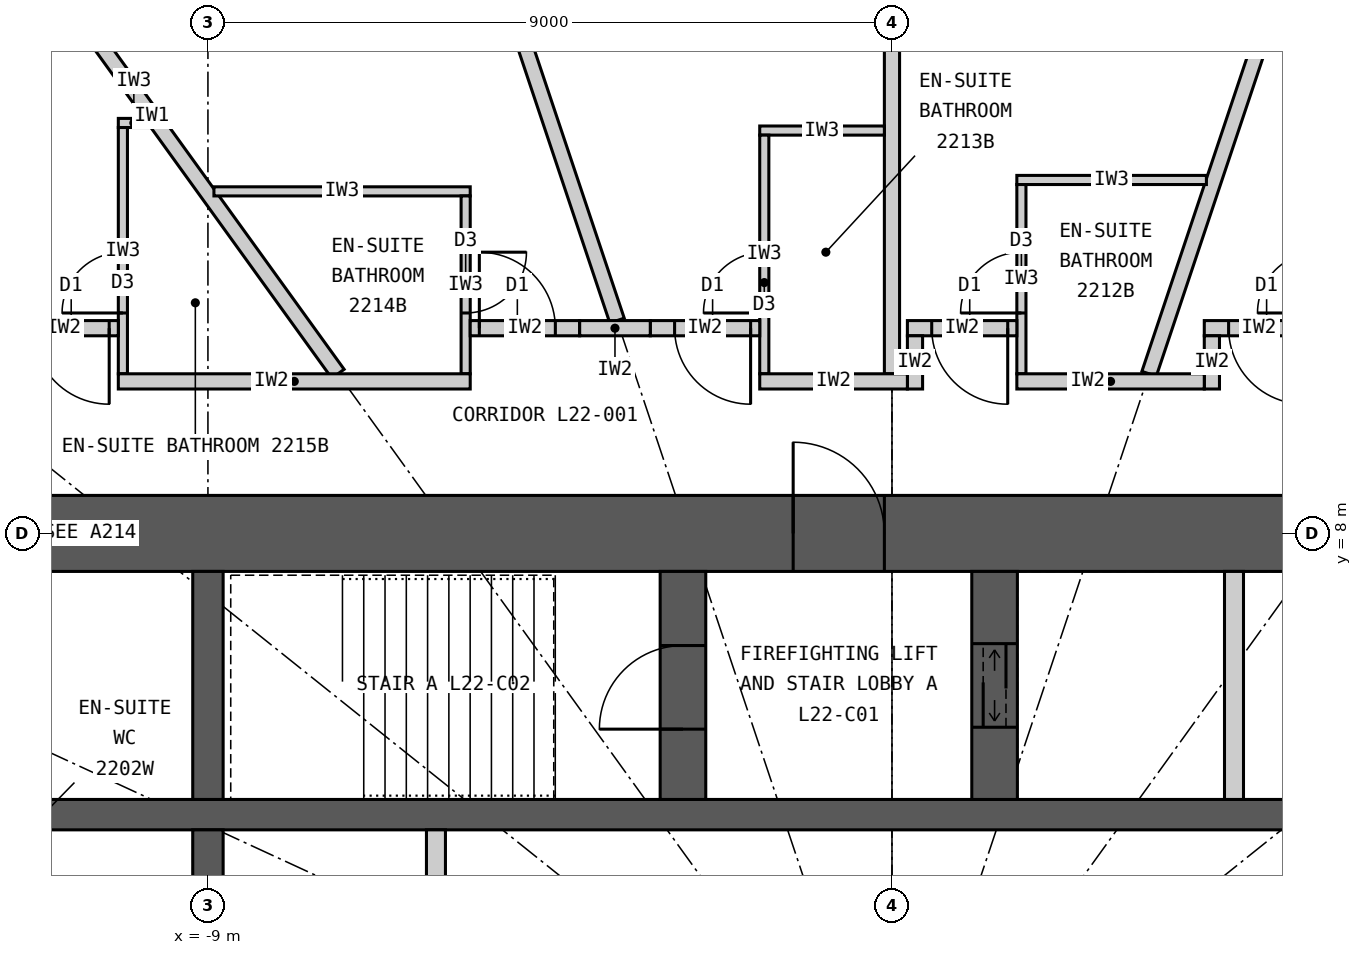
"""IFC4 building model, lengths in metres.
Left out: names, types, materials, properties, quantities, classifications, styles, units other than length and angle.
Written with IfcOpenShell. Run it as: python <this file> out.ifc"""

import sys

from ifc_helpers import new_model, si_unit, direction, frame, frame_2d, origin, place, context, subcontext, project, spatial, rectangle, extrude, element, fill, save


model = new_model("IFC4")
c1 = context("Model", 3, precision=1e-05, world=origin(), true_north=direction((0.0, 1.0)))
c2 = subcontext(c1, "Body", "Model", "MODEL_VIEW")
j1 = project(units=[si_unit("LENGTHUNIT", "METRE"), si_unit("PLANEANGLEUNIT", "RADIAN")], contexts=[c1])
p1 = place(None, origin())
s1 = spatial("IfcSite", under=j1, at=p1, CompositionType="ELEMENT")
p2 = place(p1, origin())
s2 = spatial("IfcBuilding", under=s1, at=p2, CompositionType="ELEMENT")
p3 = place(p2, frame((0.0, 0.0, 87.0)))
s3 = spatial("IfcBuildingStorey", under=s2, at=p3, CompositionType="ELEMENT", Elevation=87.0)
p4 = place(p3, frame((-12.5, 8.0, 0.0), z_axis=(0.0, 0.0, 1.0), x_axis=(1.0, 0.0, 0.0)))
e1 = element("IfcWall", 1, at=p4, inside=s3, PredefinedType="SHEAR", context=c2, shape_type="SweptSolid", body=[
    extrude(rectangle(XDim=25.0, YDim=1.0, at=frame_2d((12.5, 0.0))), origin(), (0.0, 0.0, 1.0), 3.3),
])
p5 = place(p4, frame((11.2, 0.0, 0.0)))
e2 = element("IfcOpeningElement", 2, at=p5, cuts=e1, PredefinedType="OPENING", context=c2, shape_type="SweptSolid", body=[
    extrude(rectangle(XDim=1.2, YDim=2.2, at=frame_2d((0.6, 1.1))), frame((0.0, 0.51, 0.0), z_axis=(0.0, -1.0, 0.0), x_axis=(1.0, 0.0, 0.0)), (0.0, 0.0, 1.0), 1.02),
])
p6 = place(p4, frame((18.8, 0.0, 0.0)))
e3 = element("IfcOpeningElement", 3, at=p6, cuts=e1, PredefinedType="OPENING", context=c2, shape_type="SweptSolid", body=[
    extrude(rectangle(XDim=0.9, YDim=2.2, at=frame_2d((0.45, 1.1))), frame((0.0, 0.51, 0.0), z_axis=(0.0, -1.0, 0.0), x_axis=(1.0, 0.0, 0.0)), (0.0, 0.0, 1.0), 1.02),
])
p7 = place(p3, frame((-11.5, 4.3, 0.0), z_axis=(0.0, 0.0, 1.0), x_axis=(1.0, 0.0, 0.0)))
e4 = element("IfcWall", 4, at=p7, inside=s3, PredefinedType="SHEAR", context=c2, shape_type="SweptSolid", body=[
    extrude(rectangle(XDim=23.0, YDim=0.4, at=frame_2d((11.5, 0.0))), origin(), (0.0, 0.0, 1.0), 3.3),
])
p8 = place(p3, frame((-9.0, 4.5, 0.0), z_axis=(0.0, 0.0, 1.0), x_axis=(0.0, 1.0, 0.0)))
e5 = element("IfcWall", 5, at=p8, inside=s3, PredefinedType="SHEAR", context=c2, shape_type="SweptSolid", body=[
    extrude(rectangle(XDim=3.0, YDim=0.4, at=frame_2d((1.5, 0.0))), origin(), (0.0, 0.0, 1.0), 3.3),
])
p9 = place(p3, frame((-9.0, 1.75, 0.0), z_axis=(0.0, 0.0, 1.0), x_axis=(0.0, 1.0, 0.0)))
e6 = element("IfcWall", 6, at=p9, inside=s3, PredefinedType="SHEAR", context=c2, shape_type="SweptSolid", body=[
    extrude(rectangle(XDim=2.35, YDim=0.4, at=frame_2d((1.175, 0.0))), origin(), (0.0, 0.0, 1.0), 3.3),
])
p10 = place(p3, frame((-2.75, 4.5, 0.0), z_axis=(0.0, 0.0, 1.0), x_axis=(0.0, 1.0, 0.0)))
e7 = element("IfcWall", 7, at=p10, inside=s3, PredefinedType="SHEAR", context=c2, shape_type="SweptSolid", body=[
    extrude(rectangle(XDim=3.0, YDim=0.6, at=frame_2d((1.5, 0.0))), origin(), (0.0, 0.0, 1.0), 3.3),
])
p11 = place(p10, frame((0.925, 0.0, 0.0)))
e8 = element("IfcOpeningElement", 8, at=p11, cuts=e7, PredefinedType="OPENING", context=c2, shape_type="SweptSolid", body=[
    extrude(rectangle(XDim=1.1, YDim=2.2, at=frame_2d((0.55, 1.1))), frame((0.0, 0.31, 0.0), z_axis=(0.0, -1.0, 0.0), x_axis=(1.0, 0.0, 0.0)), (0.0, 0.0, 1.0), 0.62),
])
p12 = place(p3, frame((1.35, 4.5, 0.0), z_axis=(0.0, 0.0, 1.0), x_axis=(0.0, 1.0, 0.0)))
e9 = element("IfcWall", 9, at=p12, inside=s3, PredefinedType="SHEAR", context=c2, shape_type="SweptSolid", body=[
    extrude(rectangle(XDim=3.0, YDim=0.6, at=frame_2d((1.5, 0.0))), origin(), (0.0, 0.0, 1.0), 3.3),
])
p13 = place(p12, frame((0.95, 0.0, 0.0)))
e10 = element("IfcOpeningElement", 10, at=p13, cuts=e9, PredefinedType="OPENING", context=c2, shape_type="SweptSolid", body=[
    extrude(rectangle(XDim=1.1, YDim=2.2, at=frame_2d((0.55, 1.1))), frame((0.0, 0.31, 0.0), z_axis=(0.0, -1.0, 0.0), x_axis=(1.0, 0.0, 0.0)), (0.0, 0.0, 1.0), 0.62),
])
p14 = place(p3, frame((4.5, 4.5, 0.0), z_axis=(0.0, 0.0, 1.0), x_axis=(0.0, 1.0, 0.0)))
e11 = element("IfcWall", 11, at=p14, inside=s3, PredefinedType="PARTITIONING", context=c2, shape_type="SweptSolid", body=[
    extrude(rectangle(XDim=3.0, YDim=0.25, at=frame_2d((1.5, 0.0))), origin(), (0.0, 0.0, 1.0), 3.3),
])
p15 = place(p3, frame((-6.0, 1.75, 0.0), z_axis=(0.0, 0.0, 1.0), x_axis=(0.0, 1.0, 0.0)))
e12 = element("IfcWall", 12, at=p15, inside=s3, PredefinedType="PARTITIONING", context=c2, shape_type="SweptSolid", body=[
    extrude(rectangle(XDim=2.35, YDim=0.25, at=frame_2d((1.175, 0.0))), origin(), (0.0, 0.0, 1.0), 3.3),
])
p16 = place(p3, frame((3.383, 10.1, 0.0), z_axis=(0.0, 0.0, 1.0), x_axis=(0.31759592231, 0.948226149256, 0.0)))
e13 = element("IfcWall", 13, at=p16, inside=s3, PredefinedType="PARTITIONING", context=c2, shape_type="SweptSolid", body=[
    extrude(rectangle(XDim=9.098, YDim=0.2, at=frame_2d((4.549, 0.0))), origin(), (0.0, 0.0, 1.0), 2.27),
])
p17 = place(p3, frame((0.0, 10.1, 0.0), z_axis=(0.0, 0.0, 1.0), x_axis=(0.0, 1.0, 0.0)))
e14 = element("IfcWall", 14, at=p17, inside=s3, PredefinedType="PARTITIONING", context=c2, shape_type="SweptSolid", body=[
    extrude(rectangle(XDim=9.25, YDim=0.2, at=frame_2d((4.625, 0.0))), origin(), (0.0, 0.0, 1.0), 2.27),
])
p18 = place(p3, frame((-3.617, 10.8, 0.0), z_axis=(0.0, 0.0, 1.0), x_axis=(-0.317576599239, 0.948232621046, 0.0)))
e15 = element("IfcWall", 15, at=p18, inside=s3, PredefinedType="PARTITIONING", context=c2, shape_type="SweptSolid", body=[
    extrude(rectangle(XDim=8.36, YDim=0.2, at=frame_2d((4.18, 0.0))), origin(), (0.0, 0.0, 1.0), 2.27),
])
p19 = place(p3, frame((-7.289, 10.1, 0.0), z_axis=(0.0, 0.0, 1.0), x_axis=(-0.585198353053, 0.810890182197, 0.0)))
e16 = element("IfcWall", 16, at=p19, inside=s3, PredefinedType="PARTITIONING", context=c2, shape_type="SweptSolid", body=[
    extrude(rectangle(XDim=8.36, YDim=0.2, at=frame_2d((4.18, 0.0))), origin(), (0.0, 0.0, 1.0), 2.27),
])
p20 = place(p3, frame((4.137, 12.65, 0.0), z_axis=(0.0, 0.0, 1.0), x_axis=(-1.0, 0.0, 0.0)))
e17 = element("IfcWall", 17, at=p20, inside=s3, PredefinedType="PARTITIONING", context=c2, shape_type="SweptSolid", body=[
    extrude(rectangle(XDim=2.494, YDim=0.12, at=frame_2d((1.247, 0.0))), origin(), (0.0, 0.0, 1.0), 3.12),
])
p21 = place(p3, frame((1.703, 10.1, 0.0), z_axis=(0.0, 0.0, 1.0), x_axis=(0.0, 1.0, 0.0)))
e18 = element("IfcWall", 18, at=p21, inside=s3, PredefinedType="PARTITIONING", context=c2, shape_type="SweptSolid", body=[
    extrude(rectangle(XDim=2.49, YDim=0.12, at=frame_2d((1.245, 0.0))), origin(), (0.0, 0.0, 1.0), 3.12),
])
p22 = place(p21, frame((0.8, 0.0, 0.0)))
e19 = element("IfcOpeningElement", 19, at=p22, cuts=e18, PredefinedType="OPENING", context=c2, shape_type="SweptSolid", body=[
    extrude(rectangle(XDim=0.8, YDim=2.1, at=frame_2d((0.4, 1.05))), frame((0.0, 0.07, 0.0), z_axis=(0.0, -1.0, 0.0), x_axis=(1.0, 0.0, 0.0)), (0.0, 0.0, 1.0), 0.14),
])
p23 = place(p3, frame((-0.1, 13.3, 0.0), z_axis=(0.0, 0.0, 1.0), x_axis=(-1.0, 0.0, 0.0)))
e20 = element("IfcWall", 20, at=p23, inside=s3, PredefinedType="PARTITIONING", context=c2, shape_type="SweptSolid", body=[
    extrude(rectangle(XDim=1.64, YDim=0.12, at=frame_2d((0.82, 0.0))), origin(), (0.0, 0.0, 1.0), 3.12),
])
p24 = place(p3, frame((-1.68, 10.1, 0.0), z_axis=(0.0, 0.0, 1.0), x_axis=(0.0, 1.0, 0.0)))
e21 = element("IfcWall", 21, at=p24, inside=s3, PredefinedType="PARTITIONING", context=c2, shape_type="SweptSolid", body=[
    extrude(rectangle(XDim=3.14, YDim=0.12, at=frame_2d((1.57, 0.0))), origin(), (0.0, 0.0, 1.0), 3.12),
])
p25 = place(p24, frame((0.8, 0.0, 0.0)))
e22 = element("IfcOpeningElement", 22, at=p25, cuts=e21, PredefinedType="OPENING", context=c2, shape_type="SweptSolid", body=[
    extrude(rectangle(XDim=0.8, YDim=2.1, at=frame_2d((0.4, 1.05))), frame((0.0, 0.07, 0.0), z_axis=(0.0, -1.0, 0.0), x_axis=(1.0, 0.0, 0.0)), (0.0, 0.0, 1.0), 0.14),
])
p26 = place(p3, frame((-8.921, 12.5, 0.0), z_axis=(0.0, 0.0, 1.0), x_axis=(1.0, 0.0, 0.0)))
e23 = element("IfcWall", 23, at=p26, inside=s3, PredefinedType="PARTITIONING", context=c2, shape_type="SweptSolid", body=[
    extrude(rectangle(XDim=3.372, YDim=0.12, at=frame_2d((1.686, 0.0))), origin(), (0.0, 0.0, 1.0), 3.12),
])
p27 = place(p3, frame((-5.609, 10.1, 0.0), z_axis=(0.0, 0.0, 1.0), x_axis=(0.0, 1.0, 0.0)))
e24 = element("IfcWall", 24, at=p27, inside=s3, PredefinedType="PARTITIONING", context=c2, shape_type="SweptSolid", body=[
    extrude(rectangle(XDim=2.34, YDim=0.12, at=frame_2d((1.17, 0.0))), origin(), (0.0, 0.0, 1.0), 3.12),
])
p28 = place(p27, frame((0.8, 0.0, 0.0)))
e25 = element("IfcOpeningElement", 25, at=p28, cuts=e24, PredefinedType="OPENING", context=c2, shape_type="SweptSolid", body=[
    extrude(rectangle(XDim=0.8, YDim=2.1, at=frame_2d((0.4, 1.05))), frame((0.0, 0.07, 0.0), z_axis=(0.0, -1.0, 0.0), x_axis=(1.0, 0.0, 0.0)), (0.0, 0.0, 1.0), 0.14),
])
p29 = place(p3, frame((-9.771, 13.4, 0.0), z_axis=(0.0, 0.0, 1.0), x_axis=(-1.0, 0.0, 0.0)))
e26 = element("IfcWall", 26, at=p29, inside=s3, PredefinedType="PARTITIONING", context=c2, shape_type="SweptSolid", body=[
    extrude(rectangle(XDim=0.408, YDim=0.12, at=frame_2d((0.204, 0.0))), origin(), (0.0, 0.0, 1.0), 3.12),
])
p30 = place(p3, frame((-10.119, 10.1, 0.0), z_axis=(0.0, 0.0, 1.0), x_axis=(0.0, 1.0, 0.0)))
e27 = element("IfcWall", 27, at=p30, inside=s3, PredefinedType="PARTITIONING", context=c2, shape_type="SweptSolid", body=[
    extrude(rectangle(XDim=3.24, YDim=0.12, at=frame_2d((1.62, 0.0))), origin(), (0.0, 0.0, 1.0), 3.12),
])
p31 = place(p30, frame((0.8, 0.0, 0.0)))
e28 = element("IfcOpeningElement", 28, at=p31, cuts=e27, PredefinedType="OPENING", context=c2, shape_type="SweptSolid", body=[
    extrude(rectangle(XDim=0.8, YDim=2.1, at=frame_2d((0.4, 1.05))), frame((0.0, 0.07, 0.0), z_axis=(0.0, -1.0, 0.0), x_axis=(1.0, 0.0, 0.0)), (0.0, 0.0, 1.0), 0.14),
])
p32 = place(p3, frame((4.109, 10.7, 0.0), z_axis=(0.0, 0.0, 1.0), x_axis=(1.0, 0.0, 0.0)))
e29 = element("IfcWall", 29, at=p32, inside=s3, PredefinedType="PARTITIONING", context=c2, shape_type="SweptSolid", body=[
    extrude(rectangle(XDim=1.44, YDim=0.2, at=frame_2d((0.72, 0.0))), origin(), (0.0, 0.0, 1.0), 3.12),
])
p33 = place(p32, frame((0.32, 0.0, 0.0)))
e30 = element("IfcOpeningElement", 30, at=p33, cuts=e29, PredefinedType="OPENING", context=c2, shape_type="SweptSolid", body=[
    extrude(rectangle(XDim=1.0, YDim=2.2, at=frame_2d((0.5, 1.1))), frame((0.0, 0.11, 0.0), z_axis=(0.0, -1.0, 0.0), x_axis=(1.0, 0.0, 0.0)), (0.0, 0.0, 1.0), 0.22),
])
p34 = place(p3, frame((4.209, 9.9, 0.0), z_axis=(0.0, 0.0, 1.0), x_axis=(0.0, 1.0, 0.0)))
e31 = element("IfcWall", 31, at=p34, inside=s3, PredefinedType="PARTITIONING", context=c2, shape_type="SweptSolid", body=[
    extrude(rectangle(XDim=0.7, YDim=0.2, at=frame_2d((0.35, 0.0))), origin(), (0.0, 0.0, 1.0), 3.12),
])
p35 = place(p3, frame((0.203, 10.7, 0.0), z_axis=(0.0, 0.0, 1.0), x_axis=(1.0, 0.0, 0.0)))
e32 = element("IfcWall", 32, at=p35, inside=s3, PredefinedType="PARTITIONING", context=c2, shape_type="SweptSolid", body=[
    extrude(rectangle(XDim=1.44, YDim=0.2, at=frame_2d((0.72, 0.0))), origin(), (0.0, 0.0, 1.0), 3.12),
])
p36 = place(p35, frame((0.32, 0.0, 0.0)))
e33 = element("IfcOpeningElement", 33, at=p36, cuts=e32, PredefinedType="OPENING", context=c2, shape_type="SweptSolid", body=[
    extrude(rectangle(XDim=1.0, YDim=2.2, at=frame_2d((0.5, 1.1))), frame((0.0, 0.11, 0.0), z_axis=(0.0, -1.0, 0.0), x_axis=(1.0, 0.0, 0.0)), (0.0, 0.0, 1.0), 0.22),
])
p37 = place(p3, frame((0.303, 9.9, 0.0), z_axis=(0.0, 0.0, 1.0), x_axis=(0.0, 1.0, 0.0)))
e34 = element("IfcWall", 34, at=p37, inside=s3, PredefinedType="PARTITIONING", context=c2, shape_type="SweptSolid", body=[
    extrude(rectangle(XDim=0.7, YDim=0.2, at=frame_2d((0.35, 0.0))), origin(), (0.0, 0.0, 1.0), 3.12),
])
p38 = place(p3, frame((-3.18, 10.7, 0.0), z_axis=(0.0, 0.0, 1.0), x_axis=(1.0, 0.0, 0.0)))
e35 = element("IfcWall", 35, at=p38, inside=s3, PredefinedType="PARTITIONING", context=c2, shape_type="SweptSolid", body=[
    extrude(rectangle(XDim=1.44, YDim=0.2, at=frame_2d((0.72, 0.0))), origin(), (0.0, 0.0, 1.0), 3.12),
])
p39 = place(p38, frame((0.32, 0.0, 0.0)))
e36 = element("IfcOpeningElement", 36, at=p39, cuts=e35, PredefinedType="OPENING", context=c2, shape_type="SweptSolid", body=[
    extrude(rectangle(XDim=1.0, YDim=2.2, at=frame_2d((0.5, 1.1))), frame((0.0, 0.11, 0.0), z_axis=(0.0, -1.0, 0.0), x_axis=(1.0, 0.0, 0.0)), (0.0, 0.0, 1.0), 0.22),
])
p40 = place(p3, frame((-5.549, 10.7, 0.0), z_axis=(0.0, 0.0, 1.0), x_axis=(1.0, 0.0, 0.0)))
e37 = element("IfcWall", 37, at=p40, inside=s3, PredefinedType="PARTITIONING", context=c2, shape_type="SweptSolid", body=[
    extrude(rectangle(XDim=1.44, YDim=0.2, at=frame_2d((0.72, 0.0))), origin(), (0.0, 0.0, 1.0), 3.12),
])
p41 = place(p40, frame((0.12, 0.0, 0.0)))
e38 = element("IfcOpeningElement", 38, at=p41, cuts=e37, PredefinedType="OPENING", context=c2, shape_type="SweptSolid", body=[
    extrude(rectangle(XDim=1.0, YDim=2.2, at=frame_2d((0.5, 1.1))), frame((0.0, 0.11, 0.0), z_axis=(0.0, -1.0, 0.0), x_axis=(1.0, 0.0, 0.0)), (0.0, 0.0, 1.0), 0.22),
])
p42 = place(p3, frame((-11.619, 10.7, 0.0), z_axis=(0.0, 0.0, 1.0), x_axis=(1.0, 0.0, 0.0)))
e39 = element("IfcWall", 39, at=p42, inside=s3, PredefinedType="PARTITIONING", context=c2, shape_type="SweptSolid", body=[
    extrude(rectangle(XDim=1.44, YDim=0.2, at=frame_2d((0.72, 0.0))), origin(), (0.0, 0.0, 1.0), 3.12),
])
p43 = place(p42, frame((0.32, 0.0, 0.0)))
e40 = element("IfcOpeningElement", 40, at=p43, cuts=e39, PredefinedType="OPENING", context=c2, shape_type="SweptSolid", body=[
    extrude(rectangle(XDim=1.0, YDim=2.2, at=frame_2d((0.5, 1.1))), frame((0.0, 0.11, 0.0), z_axis=(0.0, -1.0, 0.0), x_axis=(1.0, 0.0, 0.0)), (0.0, 0.0, 1.0), 0.22),
])
p44 = place(p3, frame((-4.109, 10.7, 0.0), z_axis=(0.0, 0.0, 1.0), x_axis=(1.0, 0.0, 0.0)))
e41 = element("IfcWall", 41, at=p44, inside=s3, PredefinedType="PARTITIONING", context=c2, shape_type="SweptSolid", body=[
    extrude(rectangle(XDim=0.929, YDim=0.2, at=frame_2d((0.465, 0.0))), origin(), (0.0, 0.0, 1.0), 3.12),
])
p45 = place(p3, frame((-10.179, 10.0, 0.0), z_axis=(0.0, 0.0, 1.0), x_axis=(1.0, 0.0, 0.0)))
e42 = element("IfcWall", 42, at=p45, inside=s3, PredefinedType="PARTITIONING", context=c2, shape_type="SweptSolid", body=[
    extrude(rectangle(XDim=4.63, YDim=0.2, at=frame_2d((2.315, 0.0))), origin(), (0.0, 0.0, 1.0), 3.12),
])
p46 = place(p3, frame((-1.74, 10.0, 0.0), z_axis=(0.0, 0.0, 1.0), x_axis=(1.0, 0.0, 0.0)))
e43 = element("IfcWall", 43, at=p46, inside=s3, PredefinedType="PARTITIONING", context=c2, shape_type="SweptSolid", body=[
    extrude(rectangle(XDim=1.943, YDim=0.2, at=frame_2d((0.971, 0.0))), origin(), (0.0, 0.0, 1.0), 3.12),
])
p47 = place(p3, frame((1.643, 10.0, 0.0), z_axis=(0.0, 0.0, 1.0), x_axis=(1.0, 0.0, 0.0)))
e44 = element("IfcWall", 44, at=p47, inside=s3, PredefinedType="PARTITIONING", context=c2, shape_type="SweptSolid", body=[
    extrude(rectangle(XDim=2.466, YDim=0.2, at=frame_2d((1.233, 0.0))), origin(), (0.0, 0.0, 1.0), 3.12),
])
p48 = place(p33, origin())
e45 = element("IfcDoor", 45, at=p48, inside=s3, OperationType="SINGLE_SWING_RIGHT", PredefinedType="DOOR", context=c2, shape_type="SweptSolid", body=[
    extrude(rectangle(XDim=1.0, YDim=2.2, at=frame_2d((0.5, 1.1))), frame((0.0, 0.025, 0.0), z_axis=(0.0, -1.0, 0.0), x_axis=(1.0, 0.0, 0.0)), (0.0, 0.0, 1.0), 0.05),
])
fill(e30, e45)
p49 = place(p22, origin())
e46 = element("IfcDoor", 46, at=p49, inside=s3, OperationType="SINGLE_SWING_LEFT", PredefinedType="DOOR", context=c2, shape_type="SweptSolid", body=[
    extrude(rectangle(XDim=0.8, YDim=2.1, at=frame_2d((0.4, 1.05))), frame((0.0, 0.025, 0.0), z_axis=(0.0, -1.0, 0.0), x_axis=(1.0, 0.0, 0.0)), (0.0, 0.0, 1.0), 0.05),
])
fill(e19, e46)
p50 = place(p36, origin())
e47 = element("IfcDoor", 47, at=p50, inside=s3, OperationType="SINGLE_SWING_RIGHT", PredefinedType="DOOR", context=c2, shape_type="SweptSolid", body=[
    extrude(rectangle(XDim=1.0, YDim=2.2, at=frame_2d((0.5, 1.1))), frame((0.0, 0.025, 0.0), z_axis=(0.0, -1.0, 0.0), x_axis=(1.0, 0.0, 0.0)), (0.0, 0.0, 1.0), 0.05),
])
fill(e33, e47)
p51 = place(p25, origin())
e48 = element("IfcDoor", 48, at=p51, inside=s3, OperationType="SINGLE_SWING_LEFT", PredefinedType="DOOR", context=c2, shape_type="SweptSolid", body=[
    extrude(rectangle(XDim=0.8, YDim=2.1, at=frame_2d((0.4, 1.05))), frame((0.0, 0.025, 0.0), z_axis=(0.0, -1.0, 0.0), x_axis=(1.0, 0.0, 0.0)), (0.0, 0.0, 1.0), 0.05),
])
fill(e22, e48)
p52 = place(p39, origin())
e49 = element("IfcDoor", 49, at=p52, inside=s3, OperationType="SINGLE_SWING_RIGHT", PredefinedType="DOOR", context=c2, shape_type="SweptSolid", body=[
    extrude(rectangle(XDim=1.0, YDim=2.2, at=frame_2d((0.5, 1.1))), frame((0.0, 0.025, 0.0), z_axis=(0.0, -1.0, 0.0), x_axis=(1.0, 0.0, 0.0)), (0.0, 0.0, 1.0), 0.05),
])
fill(e36, e49)
p53 = place(p28, origin())
e50 = element("IfcDoor", 50, at=p53, inside=s3, OperationType="SINGLE_SWING_RIGHT", PredefinedType="DOOR", context=c2, shape_type="SweptSolid", body=[
    extrude(rectangle(XDim=0.8, YDim=2.1, at=frame_2d((0.4, 1.05))), frame((0.0, 0.025, 0.0), z_axis=(0.0, -1.0, 0.0), x_axis=(1.0, 0.0, 0.0)), (0.0, 0.0, 1.0), 0.05),
])
fill(e25, e50)
p54 = place(p41, origin())
e51 = element("IfcDoor", 51, at=p54, inside=s3, OperationType="SINGLE_SWING_LEFT", PredefinedType="DOOR", context=c2, shape_type="SweptSolid", body=[
    extrude(rectangle(XDim=1.0, YDim=2.2, at=frame_2d((0.5, 1.1))), frame((0.0, 0.025, 0.0), z_axis=(0.0, -1.0, 0.0), x_axis=(1.0, 0.0, 0.0)), (0.0, 0.0, 1.0), 0.05),
])
fill(e38, e51)
p55 = place(p31, origin())
e52 = element("IfcDoor", 52, at=p55, inside=s3, OperationType="SINGLE_SWING_LEFT", PredefinedType="DOOR", context=c2, shape_type="SweptSolid", body=[
    extrude(rectangle(XDim=0.8, YDim=2.1, at=frame_2d((0.4, 1.05))), frame((0.0, 0.025, 0.0), z_axis=(0.0, -1.0, 0.0), x_axis=(1.0, 0.0, 0.0)), (0.0, 0.0, 1.0), 0.05),
])
fill(e28, e52)
p56 = place(p43, origin())
e53 = element("IfcDoor", 53, at=p56, inside=s3, OperationType="SINGLE_SWING_RIGHT", PredefinedType="DOOR", context=c2, shape_type="SweptSolid", body=[
    extrude(rectangle(XDim=1.0, YDim=2.2, at=frame_2d((0.5, 1.1))), frame((0.0, 0.025, 0.0), z_axis=(0.0, -1.0, 0.0), x_axis=(1.0, 0.0, 0.0)), (0.0, 0.0, 1.0), 0.05),
])
fill(e40, e53)
p57 = place(p5, origin())
e54 = element("IfcDoor", 54, at=p57, inside=s3, OperationType="SINGLE_SWING_LEFT", PredefinedType="DOOR", context=c2, shape_type="SweptSolid", body=[
    extrude(rectangle(XDim=1.2, YDim=2.2, at=frame_2d((0.6, 1.1))), frame((0.0, 0.025, 0.0), z_axis=(0.0, -1.0, 0.0), x_axis=(1.0, 0.0, 0.0)), (0.0, 0.0, 1.0), 0.05),
])
fill(e2, e54)
p58 = place(p11, origin())
e55 = element("IfcDoor", 55, at=p58, inside=s3, OperationType="SINGLE_SWING_LEFT", PredefinedType="DOOR", context=c2, shape_type="SweptSolid", body=[
    extrude(rectangle(XDim=1.1, YDim=2.2, at=frame_2d((0.55, 1.1))), frame((0.0, 0.025, 0.0), z_axis=(0.0, -1.0, 0.0), x_axis=(1.0, 0.0, 0.0)), (0.0, 0.0, 1.0), 0.05),
])
fill(e8, e55)
p59 = place(p13, origin())
e56 = element("IfcDoor", 56, at=p59, inside=s3, OperationType="DOUBLE_DOOR_SLIDING", PredefinedType="DOOR", context=c2, shape_type="SweptSolid", body=[
    extrude(rectangle(XDim=1.1, YDim=2.2, at=frame_2d((0.55, 1.1))), frame((0.0, 0.025, 0.0), z_axis=(0.0, -1.0, 0.0), x_axis=(1.0, 0.0, 0.0)), (0.0, 0.0, 1.0), 0.05),
])
fill(e10, e56)
save(model, sys.argv[1])
